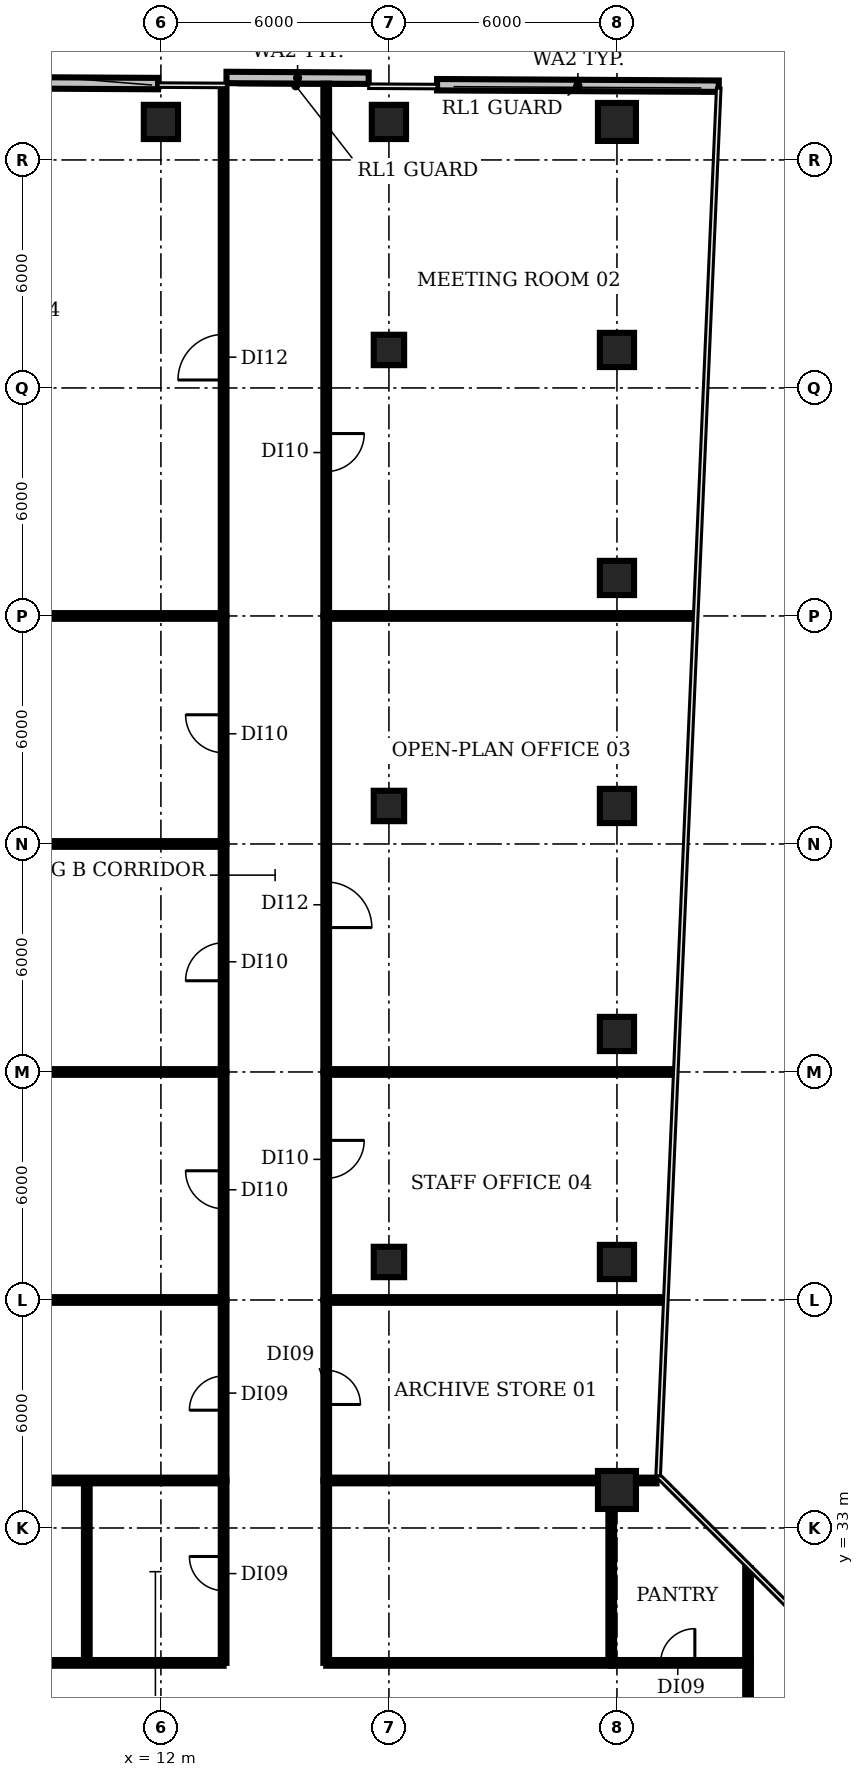
"""IFC4 building model, lengths in metres.
Left out: names, types, materials, properties, quantities, classifications, styles, units other than length and angle.
Written with IfcOpenShell. Run it as: python <this file> out.ifc"""

import sys

from ifc_helpers import new_model, si_unit, direction, frame, frame_2d, origin, origin_2d, place, context, subcontext, project, spatial, rectangle, circle, extrude, element, fill, save


model = new_model("IFC4")
c1 = context("Model", 3, precision=1e-05, world=origin(), true_north=direction((0.0, 1.0)))
c2 = subcontext(c1, "Body", "Model", "MODEL_VIEW")
j1 = project(units=[si_unit("LENGTHUNIT", "METRE"), si_unit("PLANEANGLEUNIT", "RADIAN")], contexts=[c1])
p1 = place(None, origin())
s1 = spatial("IfcSite", under=j1, at=p1, CompositionType="ELEMENT")
p2 = place(p1, origin())
s2 = spatial("IfcBuilding", under=s1, at=p2, CompositionType="ELEMENT")
p3 = place(p2, frame((0.0, 0.0, 121.4)))
s3 = spatial("IfcBuildingStorey", under=s2, at=p3, CompositionType="ELEMENT", Elevation=121.4)
p4 = place(p3, frame((12.0, 70.0, 0.0), z_axis=(0.0, 0.0, 1.0), x_axis=(1.0, 0.0, 0.0)))
e1 = element("IfcColumn", 1, at=p4, inside=s3, PredefinedType="COLUMN", context=c2, shape_type="SweptSolid", body=[
    extrude(rectangle(XDim=0.9, YDim=0.9, at=origin_2d()), origin(), (0.0, 0.0, 1.0), 3.85),
])
for number, where, z_axis, x_axis in (
    (2, (18.0, 40.0, 0.0), (0.0, 0.0, 1.0), (1.0, 0.0, 0.0)),
    (3, (18.0, 52.0, 0.0), (0.0, 0.0, 1.0), (1.0, 0.0, 0.0)),
    (4, (18.0, 64.0, 0.0), (0.0, 0.0, 1.0), (1.0, 0.0, 0.0)),
):
    element("IfcColumn", number, at=place(p3, frame(where, z_axis=z_axis, x_axis=x_axis)), inside=s3, PredefinedType="COLUMN", context=c2, shape_type="SweptSolid", body=[
        extrude(rectangle(XDim=0.8, YDim=0.8, at=origin_2d()), origin(), (0.0, 0.0, 1.0), 3.85),
    ])
p5 = place(p3, frame((18.0, 70.0, 0.0), z_axis=(0.0, 0.0, 1.0), x_axis=(1.0, 0.0, 0.0)))
e5 = element("IfcColumn", 5, at=p5, inside=s3, PredefinedType="COLUMN", context=c2, shape_type="SweptSolid", body=[
    extrude(rectangle(XDim=0.9, YDim=0.9, at=origin_2d()), origin(), (0.0, 0.0, 1.0), 3.85),
])
p6 = place(p3, frame((24.0, 34.0, 0.0), z_axis=(0.0, 0.0, 1.0), x_axis=(1.0, 0.0, 0.0)))
e6 = element("IfcColumn", 6, at=p6, inside=s3, PredefinedType="COLUMN", context=c2, shape_type="SweptSolid", body=[
    extrude(circle(Radius=0.5, at=origin_2d()), origin(), (0.0, 0.0, 1.0), 3.85),
])
for number, where, z_axis, x_axis in (
    (7, (24.0, 40.0, 0.0), (0.0, 0.0, 1.0), (1.0, 0.0, 0.0)),
    (8, (24.0, 46.0, 0.0), (0.0, 0.0, 1.0), (1.0, 0.0, 0.0)),
    (9, (24.0, 52.0, 0.0), (0.0, 0.0, 1.0), (1.0, 0.0, 0.0)),
    (10, (24.0, 58.0, 0.0), (0.0, 0.0, 1.0), (1.0, 0.0, 0.0)),
    (11, (24.0, 64.0, 0.0), (0.0, 0.0, 1.0), (1.0, 0.0, 0.0)),
):
    element("IfcColumn", number, at=place(p3, frame(where, z_axis=z_axis, x_axis=x_axis)), inside=s3, PredefinedType="COLUMN", context=c2, shape_type="SweptSolid", body=[
        extrude(rectangle(XDim=0.9, YDim=0.9, at=origin_2d()), origin(), (0.0, 0.0, 1.0), 3.85),
    ])
p7 = place(p3, frame((24.0, 70.0, 0.0), z_axis=(0.0, 0.0, 1.0), x_axis=(1.0, 0.0, 0.0)))
e12 = element("IfcColumn", 12, at=p7, inside=s3, PredefinedType="COLUMN", context=c2, shape_type="SweptSolid", body=[
    extrude(circle(Radius=0.5, at=origin_2d()), origin(), (0.0, 0.0, 1.0), 3.85),
])
p8 = place(p3, frame((26.679, 70.941, 0.0), z_axis=(0.0, 0.0, 1.0), x_axis=(-0.999985941084, 0.005302606433, 0.0)))
e13 = element("IfcWall", 13, at=p8, inside=s3, PredefinedType="SOLIDWALL", context=c2, shape_type="SweptSolid", body=[
    extrude(rectangle(XDim=7.413, YDim=0.3, at=frame_2d((3.706, 0.0))), origin(), (0.0, 0.0, 1.0), 3.85),
])
p9 = place(p3, frame((17.467, 71.15, 0.0), z_axis=(0.0, 0.0, 1.0), x_axis=(-0.999985686998, 0.005350308387, 0.0)))
e14 = element("IfcWall", 14, at=p9, inside=s3, PredefinedType="SOLIDWALL", context=c2, shape_type="SweptSolid", body=[
    extrude(rectangle(XDim=3.742, YDim=0.3, at=frame_2d((1.871, 0.0))), origin(), (0.0, 0.0, 1.0), 3.85),
])
p10 = place(p3, frame((11.925, 71.01, 0.0), z_axis=(0.0, 0.0, 1.0), x_axis=(-0.999985877611, 0.005314562814, 0.0)))
e15 = element("IfcWall", 15, at=p10, inside=s3, PredefinedType="SOLIDWALL", context=c2, shape_type="SweptSolid", body=[
    extrude(rectangle(XDim=12.955, YDim=0.3, at=frame_2d((6.477, 0.0))), origin(), (0.0, 0.0, 1.0), 3.85),
])
for number, where, z_axis, x_axis in (
    (16, (-0.98, 34.25, 0.0), (0.0, 0.0, 1.0), (1.0, 0.0, 0.0)),
    (17, (-0.98, 39.0, 0.0), (0.0, 0.0, 1.0), (1.0, 0.0, 0.0)),
    (18, (-0.98, 45.0, 0.0), (0.0, 0.0, 1.0), (1.0, 0.0, 0.0)),
    (19, (-0.98, 51.0, 0.0), (0.0, 0.0, 1.0), (1.0, 0.0, 0.0)),
    (20, (-0.98, 57.0, 0.0), (0.0, 0.0, 1.0), (1.0, 0.0, 0.0)),
):
    element("IfcWall", number, at=place(p3, frame(where, z_axis=z_axis, x_axis=x_axis)), inside=s3, PredefinedType="PARTITIONING", context=c2, shape_type="SweptSolid", body=[
        extrude(rectangle(XDim=14.63, YDim=0.15, at=frame_2d((7.315, 0.0))), origin(), (0.0, 0.0, 1.0), 2.83),
    ])
p11 = place(p3, frame((6.0, 29.45, 0.0), z_axis=(0.0, 0.0, 1.0), x_axis=(1.0, 0.0, 0.0)))
e21 = element("IfcWall", 21, at=p11, inside=s3, PredefinedType="PARTITIONING", context=c2, shape_type="SweptSolid", body=[
    extrude(rectangle(XDim=7.65, YDim=0.15, at=frame_2d((3.825, 0.0))), origin(), (0.0, 0.0, 1.0), 2.83),
])
p12 = place(p3, frame((10.05, 29.45, 0.0), z_axis=(0.0, 0.0, 1.0), x_axis=(0.0, 1.0, 0.0)))
e22 = element("IfcWall", 22, at=p12, inside=s3, PredefinedType="PARTITIONING", context=c2, shape_type="SweptSolid", body=[
    extrude(rectangle(XDim=4.8, YDim=0.15, at=frame_2d((2.4, 0.0))), origin(), (0.0, 0.0, 1.0), 2.83),
])
p13 = place(p3, frame((13.65, 29.45, 0.0), z_axis=(0.0, 0.0, 1.0), x_axis=(0.0, 1.0, 0.0)))
e23 = element("IfcWall", 23, at=p13, inside=s3, PredefinedType="PARTITIONING", context=c2, shape_type="SweptSolid", body=[
    extrude(rectangle(XDim=4.8, YDim=0.15, at=frame_2d((2.4, 0.0))), origin(), (0.0, 0.0, 1.0), 2.83),
])
p14 = place(p13, frame((1.9, 0.0, 0.0)))
e24 = element("IfcOpeningElement", 24, at=p14, cuts=e23, PredefinedType="OPENING", context=c2, shape_type="SweptSolid", body=[
    extrude(rectangle(XDim=0.9, YDim=2.1, at=frame_2d((0.45, 1.05))), frame((0.0, 0.085, 0.0), z_axis=(0.0, -1.0, 0.0), x_axis=(1.0, 0.0, 0.0)), (0.0, 0.0, 1.0), 0.17),
])
p15 = place(p3, frame((13.65, 34.25, 0.0), z_axis=(0.0, 0.0, 1.0), x_axis=(0.0, 1.0, 0.0)))
e25 = element("IfcWall", 25, at=p15, inside=s3, PredefinedType="PARTITIONING", context=c2, shape_type="SweptSolid", body=[
    extrude(rectangle(XDim=4.75, YDim=0.15, at=frame_2d((2.375, 0.0))), origin(), (0.0, 0.0, 1.0), 2.83),
])
p16 = place(p15, frame((1.85, 0.0, 0.0)))
e26 = element("IfcOpeningElement", 26, at=p16, cuts=e25, PredefinedType="OPENING", context=c2, shape_type="SweptSolid", body=[
    extrude(rectangle(XDim=0.9, YDim=2.1, at=frame_2d((0.45, 1.05))), frame((0.0, 0.085, 0.0), z_axis=(0.0, -1.0, 0.0), x_axis=(1.0, 0.0, 0.0)), (0.0, 0.0, 1.0), 0.17),
])
p17 = place(p3, frame((13.65, 39.0, 0.0), z_axis=(0.0, 0.0, 1.0), x_axis=(0.0, 1.0, 0.0)))
e27 = element("IfcWall", 27, at=p17, inside=s3, PredefinedType="PARTITIONING", context=c2, shape_type="SweptSolid", body=[
    extrude(rectangle(XDim=6.0, YDim=0.15, at=frame_2d((3.0, 0.0))), origin(), (0.0, 0.0, 1.0), 2.83),
])
p18 = place(p17, frame((2.4, 0.0, 0.0)))
e28 = element("IfcOpeningElement", 28, at=p18, cuts=e27, PredefinedType="OPENING", context=c2, shape_type="SweptSolid", body=[
    extrude(rectangle(XDim=1.0, YDim=2.1, at=frame_2d((0.5, 1.05))), frame((0.0, 0.085, 0.0), z_axis=(0.0, -1.0, 0.0), x_axis=(1.0, 0.0, 0.0)), (0.0, 0.0, 1.0), 0.17),
])
p19 = place(p3, frame((13.65, 45.0, 0.0), z_axis=(0.0, 0.0, 1.0), x_axis=(0.0, 1.0, 0.0)))
e29 = element("IfcWall", 29, at=p19, inside=s3, PredefinedType="PARTITIONING", context=c2, shape_type="SweptSolid", body=[
    extrude(rectangle(XDim=6.0, YDim=0.15, at=frame_2d((3.0, 0.0))), origin(), (0.0, 0.0, 1.0), 2.83),
])
p20 = place(p19, frame((2.4, 0.0, 0.0)))
e30 = element("IfcOpeningElement", 30, at=p20, cuts=e29, PredefinedType="OPENING", context=c2, shape_type="SweptSolid", body=[
    extrude(rectangle(XDim=1.0, YDim=2.1, at=frame_2d((0.5, 1.05))), frame((0.0, 0.085, 0.0), z_axis=(0.0, -1.0, 0.0), x_axis=(1.0, 0.0, 0.0)), (0.0, 0.0, 1.0), 0.17),
])
p21 = place(p3, frame((13.65, 51.0, 0.0), z_axis=(0.0, 0.0, 1.0), x_axis=(0.0, 1.0, 0.0)))
e31 = element("IfcWall", 31, at=p21, inside=s3, PredefinedType="PARTITIONING", context=c2, shape_type="SweptSolid", body=[
    extrude(rectangle(XDim=6.0, YDim=0.15, at=frame_2d((3.0, 0.0))), origin(), (0.0, 0.0, 1.0), 2.83),
])
p22 = place(p21, frame((2.4, 0.0, 0.0)))
e32 = element("IfcOpeningElement", 32, at=p22, cuts=e31, PredefinedType="OPENING", context=c2, shape_type="SweptSolid", body=[
    extrude(rectangle(XDim=1.0, YDim=2.1, at=frame_2d((0.5, 1.05))), frame((0.0, 0.085, 0.0), z_axis=(0.0, -1.0, 0.0), x_axis=(1.0, 0.0, 0.0)), (0.0, 0.0, 1.0), 0.17),
])
p23 = place(p3, frame((13.65, 57.0, 0.0), z_axis=(0.0, 0.0, 1.0), x_axis=(0.0, 1.0, 0.0)))
e33 = element("IfcWall", 33, at=p23, inside=s3, PredefinedType="PARTITIONING", context=c2, shape_type="SweptSolid", body=[
    extrude(rectangle(XDim=13.896, YDim=0.15, at=frame_2d((6.948, 0.0))), origin(), (0.0, 0.0, 1.0), 2.83),
])
p24 = place(p23, frame((6.21, 0.0, 0.0)))
e34 = element("IfcOpeningElement", 34, at=p24, cuts=e33, PredefinedType="OPENING", context=c2, shape_type="SweptSolid", body=[
    extrude(rectangle(XDim=1.2, YDim=2.1, at=frame_2d((0.6, 1.05))), frame((0.0, 0.085, 0.0), z_axis=(0.0, -1.0, 0.0), x_axis=(1.0, 0.0, 0.0)), (0.0, 0.0, 1.0), 0.17),
])
p25 = place(p3, frame((16.35, 29.45, 0.0), z_axis=(0.0, 0.0, 1.0), x_axis=(0.0, 1.0, 0.0)))
e35 = element("IfcWall", 35, at=p25, inside=s3, PredefinedType="PARTITIONING", context=c2, shape_type="SweptSolid", body=[
    extrude(rectangle(XDim=4.8, YDim=0.15, at=frame_2d((2.4, 0.0))), origin(), (0.0, 0.0, 1.0), 2.83),
])
p26 = place(p3, frame((16.35, 29.45, 0.0), z_axis=(0.0, 0.0, 1.0), x_axis=(1.0, 0.0, 0.0)))
e36 = element("IfcWall", 36, at=p26, inside=s3, PredefinedType="PARTITIONING", context=c2, shape_type="SweptSolid", body=[
    extrude(rectangle(XDim=7.5, YDim=0.15, at=frame_2d((3.75, 0.0))), origin(), (0.0, 0.0, 1.0), 2.83),
])
p27 = place(p3, frame((16.35, 34.25, 0.0), z_axis=(0.0, 0.0, 1.0), x_axis=(1.0, 0.0, 0.0)))
e37 = element("IfcWall", 37, at=p27, inside=s3, PredefinedType="PARTITIONING", context=c2, shape_type="SweptSolid", body=[
    extrude(rectangle(XDim=8.69, YDim=0.15, at=frame_2d((4.345, 0.0))), origin(), (0.0, 0.0, 1.0), 2.83),
])
p28 = place(p3, frame((16.35, 39.0, 0.0), z_axis=(0.0, 0.0, 1.0), x_axis=(0.0, -1.0, 0.0)))
e38 = element("IfcWall", 38, at=p28, inside=s3, PredefinedType="PARTITIONING", context=c2, shape_type="SweptSolid", body=[
    extrude(rectangle(XDim=4.75, YDim=0.15, at=frame_2d((2.375, 0.0))), origin(), (0.0, 0.0, 1.0), 2.83),
])
p29 = place(p28, frame((1.85, 0.0, 0.0)))
e39 = element("IfcOpeningElement", 39, at=p29, cuts=e38, PredefinedType="OPENING", context=c2, shape_type="SweptSolid", body=[
    extrude(rectangle(XDim=0.9, YDim=2.1, at=frame_2d((0.45, 1.05))), frame((0.0, 0.085, 0.0), z_axis=(0.0, -1.0, 0.0), x_axis=(1.0, 0.0, 0.0)), (0.0, 0.0, 1.0), 0.17),
])
p30 = place(p3, frame((16.35, 39.0, 0.0), z_axis=(0.0, 0.0, 1.0), x_axis=(1.0, 0.0, 0.0)))
e40 = element("IfcWall", 40, at=p30, inside=s3, PredefinedType="PARTITIONING", context=c2, shape_type="SweptSolid", body=[
    extrude(rectangle(XDim=8.89, YDim=0.15, at=frame_2d((4.445, 0.0))), origin(), (0.0, 0.0, 1.0), 2.83),
])
p31 = place(p3, frame((16.35, 45.0, 0.0), z_axis=(0.0, 0.0, 1.0), x_axis=(0.0, -1.0, 0.0)))
e41 = element("IfcWall", 41, at=p31, inside=s3, PredefinedType="PARTITIONING", context=c2, shape_type="SweptSolid", body=[
    extrude(rectangle(XDim=6.0, YDim=0.15, at=frame_2d((3.0, 0.0))), origin(), (0.0, 0.0, 1.0), 2.83),
])
p32 = place(p31, frame((1.8, 0.0, 0.0)))
e42 = element("IfcOpeningElement", 42, at=p32, cuts=e41, PredefinedType="OPENING", context=c2, shape_type="SweptSolid", body=[
    extrude(rectangle(XDim=1.0, YDim=2.1, at=frame_2d((0.5, 1.05))), frame((0.0, 0.085, 0.0), z_axis=(0.0, -1.0, 0.0), x_axis=(1.0, 0.0, 0.0)), (0.0, 0.0, 1.0), 0.17),
])
p33 = place(p3, frame((16.35, 45.0, 0.0), z_axis=(0.0, 0.0, 1.0), x_axis=(1.0, 0.0, 0.0)))
e43 = element("IfcWall", 43, at=p33, inside=s3, PredefinedType="PARTITIONING", context=c2, shape_type="SweptSolid", body=[
    extrude(rectangle(XDim=9.15, YDim=0.15, at=frame_2d((4.575, 0.0))), origin(), (0.0, 0.0, 1.0), 2.83),
])
p34 = place(p3, frame((16.35, 57.0, 0.0), z_axis=(0.0, 0.0, 1.0), x_axis=(0.0, -1.0, 0.0)))
e44 = element("IfcWall", 44, at=p34, inside=s3, PredefinedType="PARTITIONING", context=c2, shape_type="SweptSolid", body=[
    extrude(rectangle(XDim=12.0, YDim=0.15, at=frame_2d((6.0, 0.0))), origin(), (0.0, 0.0, 1.0), 2.83),
])
p35 = place(p34, frame((7.0, 0.0, 0.0)))
e45 = element("IfcOpeningElement", 45, at=p35, cuts=e44, PredefinedType="OPENING", context=c2, shape_type="SweptSolid", body=[
    extrude(rectangle(XDim=1.2, YDim=2.1, at=frame_2d((0.6, 1.05))), frame((0.0, 0.085, 0.0), z_axis=(0.0, -1.0, 0.0), x_axis=(1.0, 0.0, 0.0)), (0.0, 0.0, 1.0), 0.17),
])
p36 = place(p3, frame((16.35, 57.0, 0.0), z_axis=(0.0, 0.0, 1.0), x_axis=(1.0, 0.0, 0.0)))
e46 = element("IfcWall", 46, at=p36, inside=s3, PredefinedType="PARTITIONING", context=c2, shape_type="SweptSolid", body=[
    extrude(rectangle(XDim=9.67, YDim=0.15, at=frame_2d((4.835, 0.0))), origin(), (0.0, 0.0, 1.0), 2.83),
])
p37 = place(p3, frame((16.35, 71.006, 0.0), z_axis=(0.0, 0.0, 1.0), x_axis=(0.0, -1.0, 0.0)))
e47 = element("IfcWall", 47, at=p37, inside=s3, PredefinedType="PARTITIONING", context=c2, shape_type="SweptSolid", body=[
    extrude(rectangle(XDim=14.006, YDim=0.15, at=frame_2d((7.003, 0.0))), origin(), (0.0, 0.0, 1.0), 2.83),
])
p38 = place(p37, frame((9.206, 0.0, 0.0)))
e48 = element("IfcOpeningElement", 48, at=p38, cuts=e47, PredefinedType="OPENING", context=c2, shape_type="SweptSolid", body=[
    extrude(rectangle(XDim=1.0, YDim=2.1, at=frame_2d((0.5, 1.05))), frame((0.0, 0.085, 0.0), z_axis=(0.0, -1.0, 0.0), x_axis=(1.0, 0.0, 0.0)), (0.0, 0.0, 1.0), 0.17),
])
p39 = place(p3, frame((23.85, 29.45, 0.0), z_axis=(0.0, 0.0, 1.0), x_axis=(0.0, 1.0, 0.0)))
e49 = element("IfcWall", 49, at=p39, inside=s3, PredefinedType="PARTITIONING", context=c2, shape_type="SweptSolid", body=[
    extrude(rectangle(XDim=4.8, YDim=0.15, at=frame_2d((2.4, 0.0))), origin(), (0.0, 0.0, 1.0), 2.83),
])
p40 = place(p3, frame((23.85, 29.45, 0.0), z_axis=(0.0, 0.0, 1.0), x_axis=(1.0, 0.0, 0.0)))
e50 = element("IfcWall", 50, at=p40, inside=s3, PredefinedType="PARTITIONING", context=c2, shape_type="SweptSolid", body=[
    extrude(rectangle(XDim=3.6, YDim=0.15, at=frame_2d((1.8, 0.0))), origin(), (0.0, 0.0, 1.0), 2.83),
])
p41 = place(p40, frame((1.3, 0.0, 0.0)))
e51 = element("IfcOpeningElement", 51, at=p41, cuts=e50, PredefinedType="OPENING", context=c2, shape_type="SweptSolid", body=[
    extrude(rectangle(XDim=0.9, YDim=2.1, at=frame_2d((0.45, 1.05))), frame((0.0, 0.085, 0.0), z_axis=(0.0, -1.0, 0.0), x_axis=(1.0, 0.0, 0.0)), (0.0, 0.0, 1.0), 0.17),
])
p42 = place(p3, frame((27.45, 25.55, 0.0), z_axis=(0.0, 0.0, 1.0), x_axis=(0.0, 1.0, 0.0)))
e52 = element("IfcWall", 52, at=p42, inside=s3, PredefinedType="PARTITIONING", context=c2, shape_type="SweptSolid", body=[
    extrude(rectangle(XDim=3.9, YDim=0.15, at=frame_2d((1.95, 0.0))), origin(), (0.0, 0.0, 1.0), 2.83),
])
p43 = place(p3, frame((27.45, 29.45, 0.0), z_axis=(0.0, 0.0, 1.0), x_axis=(0.0, 1.0, 0.0)))
e53 = element("IfcWall", 53, at=p43, inside=s3, PredefinedType="PARTITIONING", context=c2, shape_type="SweptSolid", body=[
    extrude(rectangle(XDim=2.49, YDim=0.15, at=frame_2d((1.245, 0.0))), origin(), (0.0, 0.0, 1.0), 2.83),
])
p44 = place(p14, origin())
e54 = element("IfcDoor", 54, at=p44, inside=s3, OperationType="SINGLE_SWING_RIGHT", PredefinedType="DOOR", context=c2, shape_type="SweptSolid", body=[
    extrude(rectangle(XDim=0.9, YDim=2.1, at=frame_2d((0.45, 1.05))), frame((0.0, 0.025, 0.0), z_axis=(0.0, -1.0, 0.0), x_axis=(1.0, 0.0, 0.0)), (0.0, 0.0, 1.0), 0.05),
])
fill(e24, e54)
p45 = place(p16, origin())
e55 = element("IfcDoor", 55, at=p45, inside=s3, OperationType="SINGLE_SWING_LEFT", PredefinedType="DOOR", context=c2, shape_type="SweptSolid", body=[
    extrude(rectangle(XDim=0.9, YDim=2.1, at=frame_2d((0.45, 1.05))), frame((0.0, 0.025, 0.0), z_axis=(0.0, -1.0, 0.0), x_axis=(1.0, 0.0, 0.0)), (0.0, 0.0, 1.0), 0.05),
])
fill(e26, e55)
p46 = place(p18, origin())
e56 = element("IfcDoor", 56, at=p46, inside=s3, OperationType="SINGLE_SWING_RIGHT", PredefinedType="DOOR", context=c2, shape_type="SweptSolid", body=[
    extrude(rectangle(XDim=1.0, YDim=2.1, at=frame_2d((0.5, 1.05))), frame((0.0, 0.025, 0.0), z_axis=(0.0, -1.0, 0.0), x_axis=(1.0, 0.0, 0.0)), (0.0, 0.0, 1.0), 0.05),
])
fill(e28, e56)
p47 = place(p20, origin())
e57 = element("IfcDoor", 57, at=p47, inside=s3, OperationType="SINGLE_SWING_LEFT", PredefinedType="DOOR", context=c2, shape_type="SweptSolid", body=[
    extrude(rectangle(XDim=1.0, YDim=2.1, at=frame_2d((0.5, 1.05))), frame((0.0, 0.025, 0.0), z_axis=(0.0, -1.0, 0.0), x_axis=(1.0, 0.0, 0.0)), (0.0, 0.0, 1.0), 0.05),
])
fill(e30, e57)
p48 = place(p22, origin())
e58 = element("IfcDoor", 58, at=p48, inside=s3, OperationType="SINGLE_SWING_RIGHT", PredefinedType="DOOR", context=c2, shape_type="SweptSolid", body=[
    extrude(rectangle(XDim=1.0, YDim=2.1, at=frame_2d((0.5, 1.05))), frame((0.0, 0.025, 0.0), z_axis=(0.0, -1.0, 0.0), x_axis=(1.0, 0.0, 0.0)), (0.0, 0.0, 1.0), 0.05),
])
fill(e32, e58)
p49 = place(p24, origin())
e59 = element("IfcDoor", 59, at=p49, inside=s3, OperationType="SINGLE_SWING_LEFT", PredefinedType="DOOR", context=c2, shape_type="SweptSolid", body=[
    extrude(rectangle(XDim=1.2, YDim=2.1, at=frame_2d((0.6, 1.05))), frame((0.0, 0.025, 0.0), z_axis=(0.0, -1.0, 0.0), x_axis=(1.0, 0.0, 0.0)), (0.0, 0.0, 1.0), 0.05),
])
fill(e34, e59)
p50 = place(p29, origin())
e60 = element("IfcDoor", 60, at=p50, inside=s3, OperationType="SINGLE_SWING_RIGHT", PredefinedType="DOOR", context=c2, shape_type="SweptSolid", body=[
    extrude(rectangle(XDim=0.9, YDim=2.1, at=frame_2d((0.45, 1.05))), frame((0.0, 0.025, 0.0), z_axis=(0.0, -1.0, 0.0), x_axis=(1.0, 0.0, 0.0)), (0.0, 0.0, 1.0), 0.05),
])
fill(e39, e60)
p51 = place(p32, origin())
e61 = element("IfcDoor", 61, at=p51, inside=s3, OperationType="SINGLE_SWING_LEFT", PredefinedType="DOOR", context=c2, shape_type="SweptSolid", body=[
    extrude(rectangle(XDim=1.0, YDim=2.1, at=frame_2d((0.5, 1.05))), frame((0.0, 0.025, 0.0), z_axis=(0.0, -1.0, 0.0), x_axis=(1.0, 0.0, 0.0)), (0.0, 0.0, 1.0), 0.05),
])
fill(e42, e61)
p52 = place(p35, origin())
e62 = element("IfcDoor", 62, at=p52, inside=s3, OperationType="SINGLE_SWING_RIGHT", PredefinedType="DOOR", context=c2, shape_type="SweptSolid", body=[
    extrude(rectangle(XDim=1.2, YDim=2.1, at=frame_2d((0.6, 1.05))), frame((0.0, 0.025, 0.0), z_axis=(0.0, -1.0, 0.0), x_axis=(1.0, 0.0, 0.0)), (0.0, 0.0, 1.0), 0.05),
])
fill(e45, e62)
p53 = place(p38, origin())
e63 = element("IfcDoor", 63, at=p53, inside=s3, OperationType="SINGLE_SWING_LEFT", PredefinedType="DOOR", context=c2, shape_type="SweptSolid", body=[
    extrude(rectangle(XDim=1.0, YDim=2.1, at=frame_2d((0.5, 1.05))), frame((0.0, 0.025, 0.0), z_axis=(0.0, -1.0, 0.0), x_axis=(1.0, 0.0, 0.0)), (0.0, 0.0, 1.0), 0.05),
])
fill(e48, e63)
p54 = place(p41, origin())
e64 = element("IfcDoor", 64, at=p54, inside=s3, OperationType="SINGLE_SWING_RIGHT", PredefinedType="DOOR", context=c2, shape_type="SweptSolid", body=[
    extrude(rectangle(XDim=0.9, YDim=2.1, at=frame_2d((0.45, 1.05))), frame((0.0, 0.025, 0.0), z_axis=(0.0, -1.0, 0.0), x_axis=(1.0, 0.0, 0.0)), (0.0, 0.0, 1.0), 0.05),
])
fill(e51, e64)
save(model, sys.argv[1])
